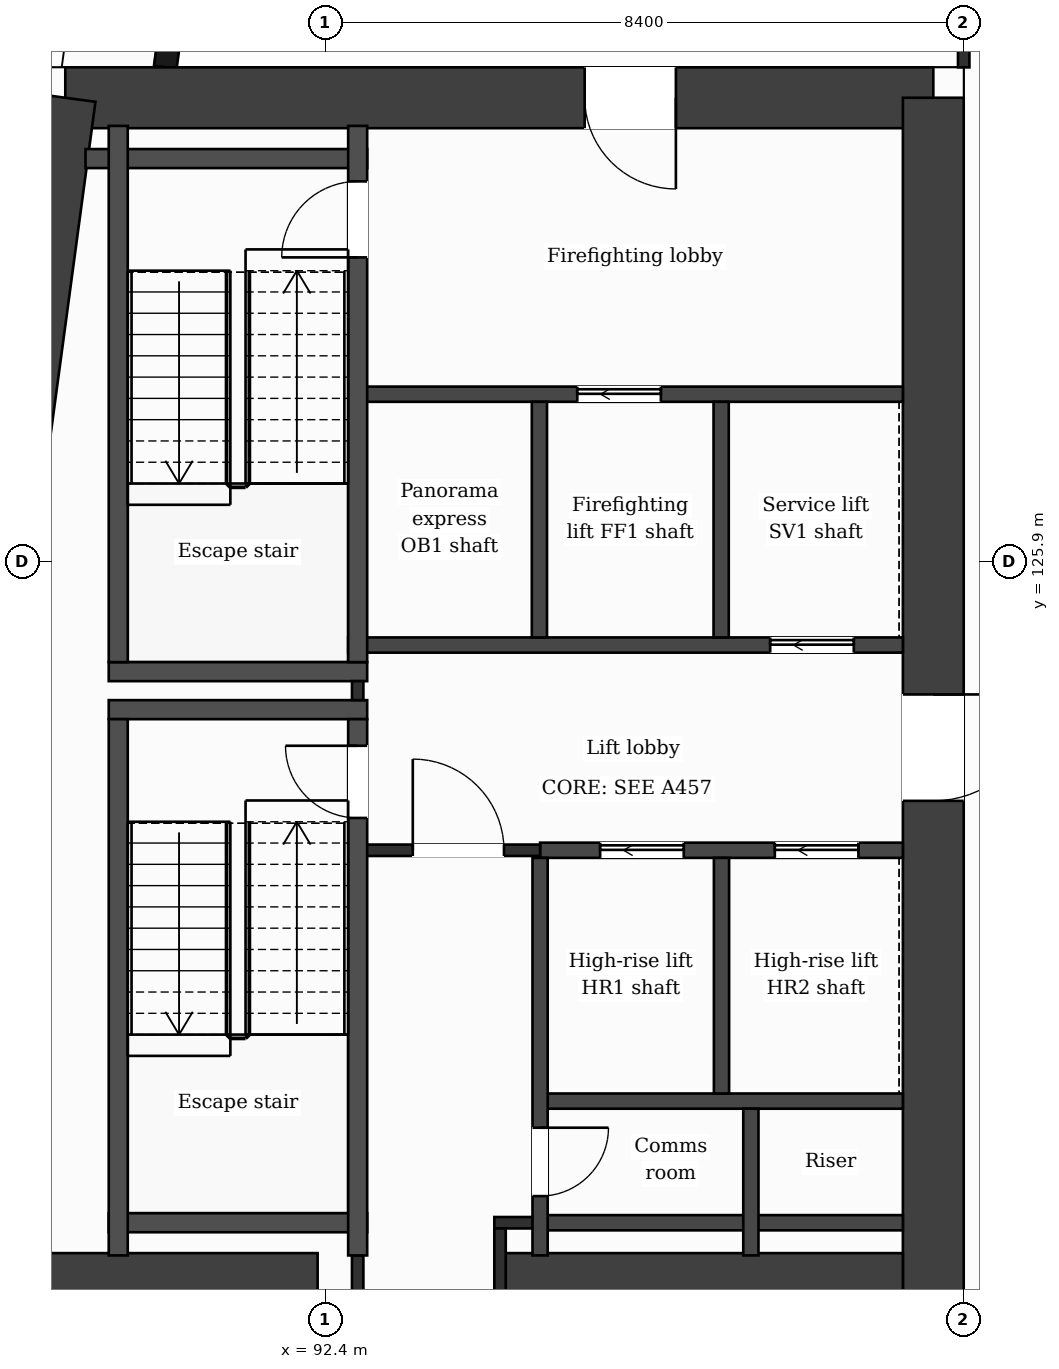
"""IFC4 building model, lengths in metres.
Left out: names, types, materials, properties, quantities, classifications, styles, units other than length and angle.
Written with IfcOpenShell. Run it as: python <this file> out.ifc"""

import sys

from ifc_helpers import new_model, si_unit, direction, frame, frame_2d, origin, place, context, subcontext, project, spatial, rectangle, extrude, element, fill, save


model = new_model("IFC4")
c1 = context("Model", 3, precision=1e-05, world=origin(), true_north=direction((0.0, 1.0)))
c2 = subcontext(c1, "Body", "Model", "MODEL_VIEW")
j1 = project(units=[si_unit("LENGTHUNIT", "METRE"), si_unit("PLANEANGLEUNIT", "RADIAN")], contexts=[c1])
p1 = place(None, origin())
s1 = spatial("IfcSite", under=j1, at=p1, CompositionType="ELEMENT")
p2 = place(p1, origin())
s2 = spatial("IfcBuilding", under=s1, at=p2, CompositionType="ELEMENT")
p3 = place(p2, frame((0.0, 0.0, 231.8)))
s3 = spatial("IfcBuildingStorey", under=s2, at=p3, CompositionType="ELEMENT", Elevation=231.8)
p4 = place(p3, frame((88.98, 132.0, 0.0), z_axis=(0.0, 0.0, 1.0), x_axis=(1.0, 0.0, 0.0)))
e1 = element("IfcWall", 1, at=p4, inside=s3, PredefinedType="SHEAR", context=c2, shape_type="SweptSolid", body=[
    extrude(rectangle(XDim=11.419, YDim=0.8, at=frame_2d((5.71, 0.0))), origin(), (0.0, 0.0, 1.0), 3.7),
])
p5 = place(p4, frame((6.833, 0.0, 0.0)))
e2 = element("IfcOpeningElement", 2, at=p5, cuts=e1, PredefinedType="OPENING", context=c2, shape_type="SweptSolid", body=[
    extrude(rectangle(XDim=1.2, YDim=2.1, at=frame_2d((0.6, 1.05))), frame((0.0, 0.41, 0.0), z_axis=(0.0, -1.0, 0.0), x_axis=(1.0, 0.0, 0.0)), (0.0, 0.0, 1.0), 0.82),
])
p6 = place(p3, frame((100.4, 132.0, 0.0), z_axis=(0.0, 0.0, 1.0), x_axis=(0.0, -1.0, 0.0)))
e3 = element("IfcWall", 3, at=p6, inside=s3, PredefinedType="SHEAR", context=c2, shape_type="SweptSolid", body=[
    extrude(rectangle(XDim=21.2, YDim=0.8, at=frame_2d((10.6, 0.0))), origin(), (0.0, 0.0, 1.0), 3.7),
])
p7 = place(p6, frame((7.85, 0.0, 0.0)))
e4 = element("IfcOpeningElement", 4, at=p7, cuts=e3, PredefinedType="OPENING", context=c2, shape_type="SweptSolid", body=[
    extrude(rectangle(XDim=1.4, YDim=2.1, at=frame_2d((0.7, 1.05))), frame((0.0, 0.41, 0.0), z_axis=(0.0, -1.0, 0.0), x_axis=(1.0, 0.0, 0.0)), (0.0, 0.0, 1.0), 0.82),
])
p8 = place(p3, frame((86.127, 110.8, 0.0), z_axis=(0.0, 0.0, 1.0), x_axis=(0.133408347329, 0.991061154956, 0.0)))
e5 = element("IfcWall", 5, at=p8, inside=s3, PredefinedType="SHEAR", context=c2, shape_type="SweptSolid", body=[
    extrude(rectangle(XDim=21.391, YDim=0.8, at=frame_2d((10.696, 0.0))), origin(), (0.0, 0.0, 1.0), 3.7),
])
p9 = place(p3, frame((87.223, 116.4, 0.0), z_axis=(0.0, 0.0, 1.0), x_axis=(1.0, 0.0, 0.0)))
e6 = element("IfcWall", 6, at=p9, inside=s3, PredefinedType="SHEAR", context=c2, shape_type="SweptSolid", body=[
    extrude(rectangle(XDim=5.077, YDim=0.8, at=frame_2d((2.539, 0.0))), origin(), (0.0, 0.0, 1.0), 3.7),
])
p10 = place(p3, frame((94.7, 116.4, 0.0), z_axis=(0.0, 0.0, 1.0), x_axis=(1.0, 0.0, 0.0)))
e7 = element("IfcWall", 7, at=p10, inside=s3, PredefinedType="SHEAR", context=c2, shape_type="SweptSolid", body=[
    extrude(rectangle(XDim=5.3, YDim=0.8, at=frame_2d((2.65, 0.0))), origin(), (0.0, 0.0, 1.0), 3.7),
])
p11 = place(p3, frame((91.177, 138.95, 0.0), z_axis=(0.0, 0.0, 1.0), x_axis=(-0.133426664613, -0.991058689065, 0.0)))
e8 = element("IfcWall", 8, at=p11, inside=s3, PredefinedType="SOLIDWALL", context=c2, shape_type="SweptSolid", body=[
    extrude(rectangle(XDim=6.609, YDim=0.3, at=frame_2d((3.305, 0.0))), origin(), (0.0, 0.0, 1.0), 3.38),
])
p12 = place(p11, frame((1.039, 0.0, 0.9)))
e9 = element("IfcOpeningElement", 9, at=p12, cuts=e8, PredefinedType="OPENING", context=c2, shape_type="SweptSolid", body=[
    extrude(rectangle(XDim=1.2, YDim=2.1, at=frame_2d((0.6, 1.05))), frame((0.0, 0.16, 0.0), z_axis=(0.0, -1.0, 0.0), x_axis=(1.0, 0.0, 0.0)), (0.0, 0.0, 1.0), 0.32),
])
p13 = place(p11, frame((4.294, 0.0, 0.0)))
e10 = element("IfcOpeningElement", 10, at=p13, cuts=e8, PredefinedType="OPENING", context=c2, shape_type="SweptSolid", body=[
    extrude(rectangle(XDim=1.2, YDim=2.4, at=frame_2d((0.6, 1.2))), frame((0.0, 0.16, 0.0), z_axis=(0.0, -1.0, 0.0), x_axis=(1.0, 0.0, 0.0)), (0.0, 0.0, 1.0), 0.32),
])
p14 = place(p3, frame((95.227, 117.2, 0.0), z_axis=(0.0, 0.0, 1.0), x_axis=(1.0, 0.0, 0.0)))
e11 = element("IfcWall", 11, at=p14, inside=s3, PredefinedType="PARTITIONING", context=c2, shape_type="SweptSolid", body=[
    extrude(rectangle(XDim=4.773, YDim=0.2, at=frame_2d((2.386, 0.0))), origin(), (0.0, 0.0, 1.0), 3.38),
])
p15 = place(p3, frame((94.625, 117.2, 0.0), z_axis=(0.0, 0.0, 1.0), x_axis=(1.0, 0.0, 0.0)))
e12 = element("IfcWall", 12, at=p15, inside=s3, PredefinedType="PARTITIONING", context=c2, shape_type="SweptSolid", body=[
    extrude(rectangle(XDim=0.602, YDim=0.15, at=frame_2d((0.301, 0.0))), origin(), (0.0, 0.0, 1.0), 3.38),
])
p16 = place(p3, frame((89.552, 117.2, 0.0), z_axis=(0.0, 0.0, 1.0), x_axis=(1.0, 0.0, 0.0)))
e13 = element("IfcWall", 13, at=p16, inside=s3, PredefinedType="PARTITIONING", context=c2, shape_type="SweptSolid", body=[
    extrude(rectangle(XDim=3.4, YDim=0.25, at=frame_2d((1.7, 0.0))), origin(), (0.0, 0.0, 1.0), 3.38),
])
p17 = place(p3, frame((95.227, 118.8, 0.0), z_axis=(0.0, 0.0, 1.0), x_axis=(1.0, 0.0, 0.0)))
e14 = element("IfcWall", 14, at=p17, inside=s3, PredefinedType="PARTITIONING", context=c2, shape_type="SweptSolid", body=[
    extrude(rectangle(XDim=4.773, YDim=0.2, at=frame_2d((2.386, 0.0))), origin(), (0.0, 0.0, 1.0), 3.38),
])
p18 = place(p3, frame((95.227, 122.1, 0.0), z_axis=(0.0, 0.0, 1.0), x_axis=(1.0, 0.0, 0.0)))
e15 = element("IfcWall", 15, at=p18, inside=s3, PredefinedType="PARTITIONING", context=c2, shape_type="SweptSolid", body=[
    extrude(rectangle(XDim=4.773, YDim=0.2, at=frame_2d((2.386, 0.0))), origin(), (0.0, 0.0, 1.0), 3.38),
])
p19 = place(p18, frame((0.79, 0.0, 0.0)))
e16 = element("IfcOpeningElement", 16, at=p19, cuts=e15, PredefinedType="OPENING", context=c2, shape_type="SweptSolid", body=[
    extrude(rectangle(XDim=1.1, YDim=2.1, at=frame_2d((0.55, 1.05))), frame((0.0, 0.11, 0.0), z_axis=(0.0, -1.0, 0.0), x_axis=(1.0, 0.0, 0.0)), (0.0, 0.0, 1.0), 0.22),
])
p20 = place(p18, frame((3.088, 0.0, 0.0)))
e17 = element("IfcOpeningElement", 17, at=p20, cuts=e15, PredefinedType="OPENING", context=c2, shape_type="SweptSolid", body=[
    extrude(rectangle(XDim=1.1, YDim=2.1, at=frame_2d((0.55, 1.05))), frame((0.0, 0.11, 0.0), z_axis=(0.0, -1.0, 0.0), x_axis=(1.0, 0.0, 0.0)), (0.0, 0.0, 1.0), 0.22),
])
p21 = place(p3, frame((92.827, 122.1, 0.0), z_axis=(0.0, 0.0, 1.0), x_axis=(1.0, 0.0, 0.0)))
e18 = element("IfcWall", 18, at=p21, inside=s3, PredefinedType="PARTITIONING", context=c2, shape_type="SweptSolid", body=[
    extrude(rectangle(XDim=2.4, YDim=0.15, at=frame_2d((1.2, 0.0))), origin(), (0.0, 0.0, 1.0), 3.38),
])
p22 = place(p21, frame((0.725, 0.0, 0.0)))
e19 = element("IfcOpeningElement", 19, at=p22, cuts=e18, PredefinedType="OPENING", context=c2, shape_type="SweptSolid", body=[
    extrude(rectangle(XDim=1.2, YDim=2.1, at=frame_2d((0.6, 1.05))), frame((0.0, 0.085, 0.0), z_axis=(0.0, -1.0, 0.0), x_axis=(1.0, 0.0, 0.0)), (0.0, 0.0, 1.0), 0.17),
])
for number, where, z_axis, x_axis in (
    (20, (89.552, 123.95, 0.0), (0.0, 0.0, 1.0), (1.0, 0.0, 0.0)),
    (21, (89.552, 124.45, 0.0), (0.0, 0.0, 1.0), (1.0, 0.0, 0.0)),
):
    element("IfcWall", number, at=place(p3, frame(where, z_axis=z_axis, x_axis=x_axis)), inside=s3, PredefinedType="PARTITIONING", context=c2, shape_type="SweptSolid", body=[
        extrude(rectangle(XDim=3.4, YDim=0.25, at=frame_2d((1.7, 0.0))), origin(), (0.0, 0.0, 1.0), 3.38),
    ])
p23 = place(p3, frame((92.702, 124.8, 0.0), z_axis=(0.0, 0.0, 1.0), x_axis=(1.0, 0.0, 0.0)))
e22 = element("IfcWall", 22, at=p23, inside=s3, PredefinedType="PARTITIONING", context=c2, shape_type="SweptSolid", body=[
    extrude(rectangle(XDim=7.298, YDim=0.2, at=frame_2d((3.649, 0.0))), origin(), (0.0, 0.0, 1.0), 3.38),
])
p24 = place(p23, frame((5.552, 0.0, 0.0)))
e23 = element("IfcOpeningElement", 23, at=p24, cuts=e22, PredefinedType="OPENING", context=c2, shape_type="SweptSolid", body=[
    extrude(rectangle(XDim=1.1, YDim=2.1, at=frame_2d((0.55, 1.05))), frame((0.0, 0.11, 0.0), z_axis=(0.0, -1.0, 0.0), x_axis=(1.0, 0.0, 0.0)), (0.0, 0.0, 1.0), 0.22),
])
p25 = place(p3, frame((92.827, 128.1, 0.0), z_axis=(0.0, 0.0, 1.0), x_axis=(1.0, 0.0, 0.0)))
e24 = element("IfcWall", 24, at=p25, inside=s3, PredefinedType="PARTITIONING", context=c2, shape_type="SweptSolid", body=[
    extrude(rectangle(XDim=7.173, YDim=0.2, at=frame_2d((3.586, 0.0))), origin(), (0.0, 0.0, 1.0), 3.38),
])
p26 = place(p25, frame((2.889, 0.0, 0.0)))
e25 = element("IfcOpeningElement", 25, at=p26, cuts=e24, PredefinedType="OPENING", context=c2, shape_type="SweptSolid", body=[
    extrude(rectangle(XDim=1.1, YDim=2.1, at=frame_2d((0.55, 1.05))), frame((0.0, 0.11, 0.0), z_axis=(0.0, -1.0, 0.0), x_axis=(1.0, 0.0, 0.0)), (0.0, 0.0, 1.0), 0.22),
])
p27 = place(p3, frame((89.246, 131.2, 0.0), z_axis=(0.0, 0.0, 1.0), x_axis=(1.0, 0.0, 0.0)))
e26 = element("IfcWall", 26, at=p27, inside=s3, PredefinedType="PARTITIONING", context=c2, shape_type="SweptSolid", body=[
    extrude(rectangle(XDim=3.706, YDim=0.25, at=frame_2d((1.853, 0.0))), origin(), (0.0, 0.0, 1.0), 3.38),
])
for number, where, z_axis, x_axis in (
    (27, (89.677, 116.77, 0.0), (0.0, 0.0, 1.0), (0.0, 1.0, 0.0)),
    (28, (89.677, 124.575, 0.0), (0.0, 0.0, 1.0), (0.0, 1.0, 0.0)),
):
    element("IfcWall", number, at=place(p3, frame(where, z_axis=z_axis, x_axis=x_axis)), inside=s3, PredefinedType="PARTITIONING", context=c2, shape_type="SweptSolid", body=[
        extrude(rectangle(XDim=7.055, YDim=0.25, at=frame_2d((3.527, 0.0))), origin(), (0.0, 0.0, 1.0), 3.38),
    ])
p28 = place(p3, frame((92.827, 116.0, 0.0), z_axis=(0.0, 0.0, 1.0), x_axis=(0.0, 1.0, 0.0)))
e29 = element("IfcWall", 29, at=p28, inside=s3, PredefinedType="PARTITIONING", context=c2, shape_type="SweptSolid", body=[
    extrude(rectangle(XDim=0.77, YDim=0.15, at=frame_2d((0.385, 0.0))), origin(), (0.0, 0.0, 1.0), 3.38),
])
p29 = place(p3, frame((92.827, 124.075, 0.0), z_axis=(0.0, 0.0, 1.0), x_axis=(0.0, 1.0, 0.0)))
e30 = element("IfcWall", 30, at=p29, inside=s3, PredefinedType="PARTITIONING", context=c2, shape_type="SweptSolid", body=[
    extrude(rectangle(XDim=0.25, YDim=0.15, at=frame_2d((0.125, 0.0))), origin(), (0.0, 0.0, 1.0), 3.38),
])
p30 = place(p3, frame((92.827, 116.77, 0.0), z_axis=(0.0, 0.0, 1.0), x_axis=(0.0, 1.0, 0.0)))
e31 = element("IfcWall", 31, at=p30, inside=s3, PredefinedType="PARTITIONING", context=c2, shape_type="SweptSolid", body=[
    extrude(rectangle(XDim=7.055, YDim=0.25, at=frame_2d((3.527, 0.0))), origin(), (0.0, 0.0, 1.0), 3.38),
])
p31 = place(p30, frame((5.755, 0.0, 0.0)))
e32 = element("IfcOpeningElement", 32, at=p31, cuts=e31, PredefinedType="OPENING", context=c2, shape_type="SweptSolid", body=[
    extrude(rectangle(XDim=0.95, YDim=2.1, at=frame_2d((0.475, 1.05))), frame((0.0, 0.135, 0.0), z_axis=(0.0, -1.0, 0.0), x_axis=(1.0, 0.0, 0.0)), (0.0, 0.0, 1.0), 0.27),
])
p32 = place(p3, frame((92.827, 124.575, 0.0), z_axis=(0.0, 0.0, 1.0), x_axis=(0.0, 1.0, 0.0)))
e33 = element("IfcWall", 33, at=p32, inside=s3, PredefinedType="PARTITIONING", context=c2, shape_type="SweptSolid", body=[
    extrude(rectangle(XDim=7.055, YDim=0.25, at=frame_2d((3.527, 0.0))), origin(), (0.0, 0.0, 1.0), 3.38),
])
p33 = place(p32, frame((5.325, 0.0, 0.0)))
e34 = element("IfcOpeningElement", 34, at=p33, cuts=e33, PredefinedType="OPENING", context=c2, shape_type="SweptSolid", body=[
    extrude(rectangle(XDim=1.0, YDim=2.1, at=frame_2d((0.5, 1.05))), frame((0.0, 0.135, 0.0), z_axis=(0.0, -1.0, 0.0), x_axis=(1.0, 0.0, 0.0)), (0.0, 0.0, 1.0), 0.27),
])
p34 = place(p3, frame((94.7, 116.0, 0.0), z_axis=(0.0, 0.0, 1.0), x_axis=(0.0, 1.0, 0.0)))
e35 = element("IfcWall", 35, at=p34, inside=s3, PredefinedType="PARTITIONING", context=c2, shape_type="SweptSolid", body=[
    extrude(rectangle(XDim=1.125, YDim=0.15, at=frame_2d((0.562, 0.0))), origin(), (0.0, 0.0, 1.0), 3.38),
])
p35 = place(p3, frame((95.218, 124.9, 0.0), z_axis=(0.0, 0.0, 1.0), x_axis=(0.0, 1.0, 0.0)))
e36 = element("IfcWall", 36, at=p35, inside=s3, PredefinedType="PARTITIONING", context=c2, shape_type="SweptSolid", body=[
    extrude(rectangle(XDim=3.1, YDim=0.2, at=frame_2d((1.55, 0.0))), origin(), (0.0, 0.0, 1.0), 3.38),
])
p36 = place(p3, frame((95.227, 116.77, 0.0), z_axis=(0.0, 0.0, 1.0), x_axis=(0.0, 1.0, 0.0)))
e37 = element("IfcWall", 37, at=p36, inside=s3, PredefinedType="PARTITIONING", context=c2, shape_type="SweptSolid", body=[
    extrude(rectangle(XDim=5.23, YDim=0.2, at=frame_2d((2.615, 0.0))), origin(), (0.0, 0.0, 1.0), 3.38),
])
p37 = place(p36, frame((0.78, 0.0, 0.0)))
e38 = element("IfcOpeningElement", 38, at=p37, cuts=e37, PredefinedType="OPENING", context=c2, shape_type="SweptSolid", body=[
    extrude(rectangle(XDim=0.9, YDim=2.1, at=frame_2d((0.45, 1.05))), frame((0.0, 0.11, 0.0), z_axis=(0.0, -1.0, 0.0), x_axis=(1.0, 0.0, 0.0)), (0.0, 0.0, 1.0), 0.22),
])
for number, where, z_axis, x_axis in (
    (39, (97.609, 124.9, 0.0), (0.0, 0.0, 1.0), (0.0, 1.0, 0.0)),
    (40, (97.614, 118.9, 0.0), (0.0, 0.0, 1.0), (0.0, 1.0, 0.0)),
):
    element("IfcWall", number, at=place(p3, frame(where, z_axis=z_axis, x_axis=x_axis)), inside=s3, PredefinedType="PARTITIONING", context=c2, shape_type="SweptSolid", body=[
        extrude(rectangle(XDim=3.1, YDim=0.2, at=frame_2d((1.55, 0.0))), origin(), (0.0, 0.0, 1.0), 3.38),
    ])
p38 = place(p3, frame((98.0, 116.77, 0.0), z_axis=(0.0, 0.0, 1.0), x_axis=(0.0, 1.0, 0.0)))
e41 = element("IfcWall", 41, at=p38, inside=s3, PredefinedType="PARTITIONING", context=c2, shape_type="SweptSolid", body=[
    extrude(rectangle(XDim=1.93, YDim=0.2, at=frame_2d((0.965, 0.0))), origin(), (0.0, 0.0, 1.0), 3.38),
])
p39 = place(p3, frame((100.8, 132.4, 0.0), z_axis=(0.0, 0.0, 1.0), x_axis=(0.0, 1.0, 0.0)))
e42 = element("IfcWall", 42, at=p39, inside=s3, PredefinedType="PARTITIONING", context=c2, shape_type="SweptSolid", body=[
    extrude(rectangle(XDim=1.325, YDim=0.15, at=frame_2d((0.663, 0.0))), origin(), (0.0, 0.0, 1.0), 3.38),
])
p40 = place(p22, origin())
e43 = element("IfcDoor", 43, at=p40, inside=s3, OperationType="SINGLE_SWING_LEFT", PredefinedType="DOOR", context=c2, shape_type="SweptSolid", body=[
    extrude(rectangle(XDim=1.2, YDim=2.1, at=frame_2d((0.6, 1.05))), frame((0.0, 0.025, 0.0), z_axis=(0.0, -1.0, 0.0), x_axis=(1.0, 0.0, 0.0)), (0.0, 0.0, 1.0), 0.05),
])
fill(e19, e43)
p41 = place(p19, origin())
e44 = element("IfcDoor", 44, at=p41, inside=s3, OperationType="SLIDING_TO_LEFT", PredefinedType="DOOR", context=c2, shape_type="SweptSolid", body=[
    extrude(rectangle(XDim=1.1, YDim=2.1, at=frame_2d((0.55, 1.05))), frame((0.0, 0.025, 0.0), z_axis=(0.0, -1.0, 0.0), x_axis=(1.0, 0.0, 0.0)), (0.0, 0.0, 1.0), 0.05),
])
fill(e16, e44)
p42 = place(p20, origin())
e45 = element("IfcDoor", 45, at=p42, inside=s3, OperationType="SLIDING_TO_LEFT", PredefinedType="DOOR", context=c2, shape_type="SweptSolid", body=[
    extrude(rectangle(XDim=1.1, YDim=2.1, at=frame_2d((0.55, 1.05))), frame((0.0, 0.025, 0.0), z_axis=(0.0, -1.0, 0.0), x_axis=(1.0, 0.0, 0.0)), (0.0, 0.0, 1.0), 0.05),
])
fill(e17, e45)
p43 = place(p26, origin())
e46 = element("IfcDoor", 46, at=p43, inside=s3, OperationType="SLIDING_TO_LEFT", PredefinedType="DOOR", context=c2, shape_type="SweptSolid", body=[
    extrude(rectangle(XDim=1.1, YDim=2.1, at=frame_2d((0.55, 1.05))), frame((0.0, 0.025, 0.0), z_axis=(0.0, -1.0, 0.0), x_axis=(1.0, 0.0, 0.0)), (0.0, 0.0, 1.0), 0.05),
])
fill(e25, e46)
p44 = place(p24, origin())
e47 = element("IfcDoor", 47, at=p44, inside=s3, OperationType="SLIDING_TO_LEFT", PredefinedType="DOOR", context=c2, shape_type="SweptSolid", body=[
    extrude(rectangle(XDim=1.1, YDim=2.1, at=frame_2d((0.55, 1.05))), frame((0.0, 0.025, 0.0), z_axis=(0.0, -1.0, 0.0), x_axis=(1.0, 0.0, 0.0)), (0.0, 0.0, 1.0), 0.05),
])
fill(e23, e47)
p45 = place(p31, origin())
e48 = element("IfcDoor", 48, at=p45, inside=s3, OperationType="SINGLE_SWING_RIGHT", PredefinedType="DOOR", context=c2, shape_type="SweptSolid", body=[
    extrude(rectangle(XDim=0.95, YDim=2.1, at=frame_2d((0.475, 1.05))), frame((0.0, 0.025, 0.0), z_axis=(0.0, -1.0, 0.0), x_axis=(1.0, 0.0, 0.0)), (0.0, 0.0, 1.0), 0.05),
])
fill(e32, e48)
p46 = place(p33, origin())
e49 = element("IfcDoor", 49, at=p46, inside=s3, OperationType="SINGLE_SWING_LEFT", PredefinedType="DOOR", context=c2, shape_type="SweptSolid", body=[
    extrude(rectangle(XDim=1.0, YDim=2.1, at=frame_2d((0.5, 1.05))), frame((0.0, 0.025, 0.0), z_axis=(0.0, -1.0, 0.0), x_axis=(1.0, 0.0, 0.0)), (0.0, 0.0, 1.0), 0.05),
])
fill(e34, e49)
p47 = place(p37, origin())
e50 = element("IfcDoor", 50, at=p47, inside=s3, OperationType="SINGLE_SWING_RIGHT", PredefinedType="DOOR", context=c2, shape_type="SweptSolid", body=[
    extrude(rectangle(XDim=0.9, YDim=2.1, at=frame_2d((0.45, 1.05))), frame((0.0, 0.025, 0.0), z_axis=(0.0, -1.0, 0.0), x_axis=(1.0, 0.0, 0.0)), (0.0, 0.0, 1.0), 0.05),
])
fill(e38, e50)
p48 = place(p5, origin())
e51 = element("IfcDoor", 51, at=p48, inside=s3, OperationType="SINGLE_SWING_RIGHT", PredefinedType="DOOR", context=c2, shape_type="SweptSolid", body=[
    extrude(rectangle(XDim=1.2, YDim=2.1, at=frame_2d((0.6, 1.05))), frame((0.0, 0.025, 0.0), z_axis=(0.0, -1.0, 0.0), x_axis=(1.0, 0.0, 0.0)), (0.0, 0.0, 1.0), 0.05),
])
fill(e2, e51)
p49 = place(p7, origin())
e52 = element("IfcDoor", 52, at=p49, inside=s3, OperationType="SINGLE_SWING_LEFT", PredefinedType="DOOR", context=c2, shape_type="SweptSolid", body=[
    extrude(rectangle(XDim=1.4, YDim=2.1, at=frame_2d((0.7, 1.05))), frame((0.0, 0.025, 0.0), z_axis=(0.0, -1.0, 0.0), x_axis=(1.0, 0.0, 0.0)), (0.0, 0.0, 1.0), 0.05),
])
fill(e4, e52)
save(model, sys.argv[1])
